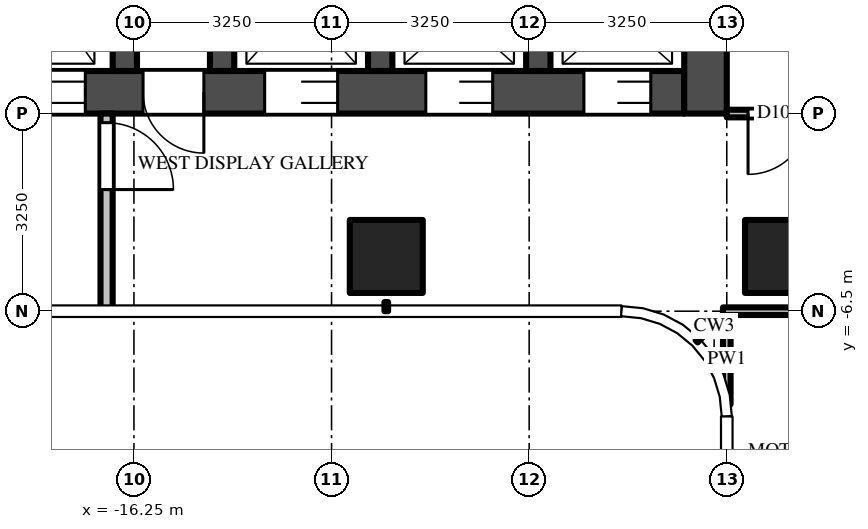
"""IFC4 building model, lengths in metres.
Left out: names, types, materials, properties, quantities, classifications, styles, units other than length and angle.
Written with IfcOpenShell. Run it as: python <this file> out.ifc"""

import sys

from ifc_helpers import new_model, si_unit, direction, frame, frame_2d, origin, origin_2d, place, context, subcontext, project, spatial, rectangle, extrude, source, transform, mapped, element, fill, save


model = new_model("IFC4")
c1 = context("Model", 3, precision=1e-05, world=origin(), true_north=direction((0.0, 1.0)))
c2 = subcontext(c1, "Body", "Model", "MODEL_VIEW")
j1 = project(units=[si_unit("LENGTHUNIT", "METRE"), si_unit("PLANEANGLEUNIT", "RADIAN")], contexts=[c1])
p1 = place(None, origin())
s1 = spatial("IfcSite", under=j1, at=p1, CompositionType="ELEMENT")
p2 = place(p1, origin())
s2 = spatial("IfcBuilding", under=s1, at=p2, CompositionType="ELEMENT")
p3 = place(p2, frame((0.0, 0.0, 185.4)))
s3 = spatial("IfcBuildingStorey", under=s2, at=p3, CompositionType="ELEMENT", Elevation=185.4)
m1 = source(origin(), c2, "Body", "SweptSolid", [
    extrude(rectangle(XDim=1.2, YDim=1.2, at=origin_2d()), origin(), (0.0, 0.0, 1.0), 3.9),
])
for number, where, z_axis, x_axis in (
    (1, (-5.6, -5.6, 0.0), (0.0, 0.0, 1.0), (1.0, 0.0, 0.0)),
    (2, (-12.1, -5.6, 0.0), (0.0, 0.0, 1.0), (1.0, 0.0, 0.0)),
):
    element("IfcColumn", number, at=place(p3, frame(where, z_axis=z_axis, x_axis=x_axis)), inside=s3, PredefinedType="COLUMN", context=c2, shape_type="MappedRepresentation", body=[
        mapped(m1, transform((0.0, 0.0, 0.0))),
    ])
m2 = source(origin(), c2, "Body", "SweptSolid", [
    extrude(rectangle(XDim=14.85, YDim=0.7, at=frame_2d((7.425, 0.0))), origin(), (0.0, 0.0, 1.0), 3.7),
])
p4 = place(p3, frame((-7.2, -2.9, 0.0), z_axis=(0.0, 0.0, 1.0), x_axis=(-1.0, 0.0, 0.0)))
e3 = element("IfcWall", 3, at=p4, inside=s3, PredefinedType="SHEAR", context=c2, shape_type="MappedRepresentation", body=[
    mapped(m2, transform((0.0, 0.0, 0.0))),
])
m3 = source(origin(), c2, "Body", "SweptSolid", [
    extrude(rectangle(XDim=1.1, YDim=2.1, at=frame_2d((0.55, 1.05))), frame((0.0, 0.36, 0.0), z_axis=(0.0, -1.0, 0.0), x_axis=(1.0, 0.0, 0.0)), (0.0, 0.0, 1.0), 0.72),
])
p5 = place(p4, frame((0.55, 0.0, 0.0)))
e4 = element("IfcOpeningElement", 4, at=p5, cuts=e3, PredefinedType="OPENING", context=c2, shape_type="MappedRepresentation", body=[
    mapped(m3, transform((0.0, 0.0, 0.0))),
])
p6 = place(p4, frame((3.15, 0.0, 0.0)))
e5 = element("IfcOpeningElement", 5, at=p6, cuts=e3, PredefinedType="OPENING", context=c2, shape_type="MappedRepresentation", body=[
    mapped(m3, transform((0.0, 0.0, 0.0))),
])
m4 = source(origin(), c2, "Body", "SweptSolid", [
    extrude(rectangle(XDim=1.2, YDim=2.1, at=frame_2d((0.6, 1.05))), frame((0.0, 0.36, 0.0), z_axis=(0.0, -1.0, 0.0), x_axis=(1.0, 0.0, 0.0)), (0.0, 0.0, 1.0), 0.72),
])
p7 = place(p4, frame((5.7, 0.0, 0.0)))
e6 = element("IfcOpeningElement", 6, at=p7, cuts=e3, PredefinedType="OPENING", context=c2, shape_type="MappedRepresentation", body=[
    mapped(m4, transform((0.0, 0.0, 0.0))),
])
m5 = source(origin(), c2, "Body", "SweptSolid", [
    extrude(rectangle(XDim=1.3, YDim=2.1, at=frame_2d((0.65, 1.05))), frame((0.0, 0.36, 0.0), z_axis=(0.0, -1.0, 0.0), x_axis=(1.0, 0.0, 0.0)), (0.0, 0.0, 1.0), 0.72),
])
p8 = place(p4, frame((12.2, 0.0, 0.0)))
e7 = element("IfcOpeningElement", 7, at=p8, cuts=e3, PredefinedType="OPENING", context=c2, shape_type="MappedRepresentation", body=[
    mapped(m5, transform((0.0, 0.0, 0.0))),
])
p9 = place(p4, frame((9.85, 0.0, 0.0)))
e8 = element("IfcOpeningElement", 8, at=p9, cuts=e3, PredefinedType="OPENING", context=c2, shape_type="MappedRepresentation", body=[
    mapped(m4, transform((0.0, 0.0, 0.0))),
])
m6 = source(origin(), c2, "Body", "SweptSolid", [
    extrude(rectangle(XDim=1.0, YDim=2.1, at=frame_2d((0.5, 1.05))), frame((0.0, 0.36, 0.0), z_axis=(0.0, -1.0, 0.0), x_axis=(1.0, 0.0, 0.0)), (0.0, 0.0, 1.0), 0.72),
])
p10 = place(p4, frame((7.9, 0.0, 0.0)))
e9 = element("IfcOpeningElement", 9, at=p10, cuts=e3, PredefinedType="OPENING", context=c2, shape_type="MappedRepresentation", body=[
    mapped(m6, transform((0.0, 0.0, 0.0))),
])
m7 = source(origin(), c2, "Body", "SweptSolid", [
    extrude(rectangle(XDim=9.05, YDim=0.7, at=frame_2d((4.525, 0.0))), origin(), (0.0, 0.0, 1.0), 3.7),
])
p11 = place(p3, frame((-6.85, 5.8, 0.0), z_axis=(0.0, 0.0, 1.0), x_axis=(0.0, -1.0, 0.0)))
e10 = element("IfcWall", 10, at=p11, inside=s3, PredefinedType="SHEAR", context=c2, shape_type="MappedRepresentation", body=[
    mapped(m7, transform((0.0, 0.0, 0.0))),
])
m8 = source(origin(), c2, "Body", "SweptSolid", [
    extrude(rectangle(XDim=1.8, YDim=2.1, at=frame_2d((0.9, 1.05))), frame((0.0, 0.36, 0.0), z_axis=(0.0, -1.0, 0.0), x_axis=(1.0, 0.0, 0.0)), (0.0, 0.0, 1.0), 0.72),
])
p12 = place(p11, frame((3.15, 0.0, 0.0)))
e11 = element("IfcOpeningElement", 11, at=p12, cuts=e10, PredefinedType="OPENING", context=c2, shape_type="MappedRepresentation", body=[
    mapped(m8, transform((0.0, 0.0, 0.0))),
])
m9 = source(origin(), c2, "Body", "SweptSolid", [
    extrude(rectangle(XDim=2.45, YDim=0.4, at=frame_2d((1.225, 0.0))), origin(), (0.0, 0.0, 1.0), 3.7),
])
for number, where, z_axis, x_axis in (
    (12, (-9.6, -0.1, 0.0), (0.0, 0.0, 1.0), (0.0, -1.0, 0.0)),
    (13, (-12.2, -0.1, 0.0), (0.0, 0.0, 1.0), (0.0, -1.0, 0.0)),
    (14, (-14.8, -0.1, 0.0), (0.0, 0.0, 1.0), (0.0, -1.0, 0.0)),
    (15, (-16.4, -0.1, 0.0), (0.0, 0.0, 1.0), (0.0, -1.0, 0.0)),
):
    element("IfcWall", number, at=place(p3, frame(where, z_axis=z_axis, x_axis=x_axis)), inside=s3, PredefinedType="SHEAR", context=c2, shape_type="MappedRepresentation", body=[
        mapped(m9, transform((0.0, 0.0, 0.0))),
    ])
m10 = source(origin(), c2, "Body", "SweptSolid", [
    extrude(rectangle(XDim=3.25, YDim=0.2, at=frame_2d((1.625, 0.0))), origin(), (0.0, 0.0, 1.0), 3.7),
])
p13 = place(p3, frame((-16.7, -3.25, 0.0), z_axis=(0.0, 0.0, 1.0), x_axis=(0.0, -1.0, 0.0)))
e16 = element("IfcWall", 16, at=p13, inside=s3, PredefinedType="PARTITIONING", context=c2, shape_type="MappedRepresentation", body=[
    mapped(m10, transform((0.0, 0.0, 0.0))),
])
m11 = source(origin(), c2, "Body", "SweptSolid", [
    extrude(rectangle(XDim=1.1, YDim=2.1, at=frame_2d((0.55, 1.05))), frame((0.0, 0.11, 0.0), z_axis=(0.0, -1.0, 0.0), x_axis=(1.0, 0.0, 0.0)), (0.0, 0.0, 1.0), 0.22),
])
p14 = place(p13, frame((0.15, 0.0, 0.0)))
e17 = element("IfcOpeningElement", 17, at=p14, cuts=e16, PredefinedType="OPENING", context=c2, shape_type="MappedRepresentation", body=[
    mapped(m11, transform((0.0, 0.0, 0.0))),
])
m12 = source(origin(), c2, "Body", "SweptSolid", [
    extrude(rectangle(XDim=1.469, YDim=0.125, at=frame_2d((0.734, 0.0))), origin(), (0.0, 0.0, 1.0), 3.7),
])
p15 = place(p3, frame((-6.5, -6.562, 0.0), z_axis=(0.0, 0.0, 1.0), x_axis=(0.0, -1.0, 0.0)))
e18 = element("IfcWall", 18, at=p15, inside=s3, PredefinedType="PARTITIONING", context=c2, shape_type="MappedRepresentation", body=[
    mapped(m12, transform((0.0, 0.0, 0.0))),
])
m13 = source(origin(), c2, "Body", "SweptSolid", [
    extrude(rectangle(XDim=3.725, YDim=0.125, at=frame_2d((1.863, 0.0))), origin(), (0.0, 0.0, 1.0), 2.78),
])
p16 = place(p3, frame((-2.837, -6.5, 0.0), z_axis=(0.0, 0.0, 1.0), x_axis=(-1.0, 0.0, 0.0)))
e19 = element("IfcWall", 19, at=p16, inside=s3, PredefinedType="PARTITIONING", context=c2, shape_type="MappedRepresentation", body=[
    mapped(m13, transform((0.0, 0.0, 0.0))),
])
m14 = source(origin(), c2, "Body", "SweptSolid", [
    extrude(rectangle(XDim=5.363, YDim=0.125, at=frame_2d((2.681, 0.0))), origin(), (0.0, 0.0, 1.0), 2.997),
])
p17 = place(p3, frame((-1.137, -3.25, 0.0), z_axis=(0.0, 0.0, 1.0), x_axis=(-1.0, 0.0, 0.0)))
e20 = element("IfcWall", 20, at=p17, inside=s3, PredefinedType="PARTITIONING", context=c2, shape_type="MappedRepresentation", body=[
    mapped(m14, transform((0.0, 0.0, 0.0))),
])
m15 = source(origin(), c2, "Body", "SweptSolid", [
    extrude(rectangle(XDim=1.0, YDim=2.1, at=frame_2d((0.5, 1.05))), frame((0.0, 0.073, 0.0), z_axis=(0.0, -1.0, 0.0), x_axis=(1.0, 0.0, 0.0)), (0.0, 0.0, 1.0), 0.145),
])
p18 = place(p17, frame((4.012, 0.0, 0.0)))
e21 = element("IfcOpeningElement", 21, at=p18, cuts=e20, PredefinedType="OPENING", context=c2, shape_type="MappedRepresentation", body=[
    mapped(m15, transform((0.0, 0.0, 0.0))),
])
m16 = source(origin(), c2, "Body", "SweptSolid", [
    extrude(rectangle(XDim=1.1, YDim=2.1, at=frame_2d((0.55, 1.05))), frame((0.0, -0.275, 0.0), z_axis=(0.0, -1.0, 0.0), x_axis=(1.0, 0.0, 0.0)), (0.0, 0.0, 1.0), 0.05),
])
p19 = place(p5, origin())
e22 = element("IfcDoor", 22, at=p19, inside=s3, OperationType="DOUBLE_DOOR_SLIDING", PredefinedType="DOOR", context=c2, shape_type="MappedRepresentation", body=[
    mapped(m16, transform((0.0, 0.0, 0.0))),
])
fill(e4, e22)
p20 = place(p6, origin())
e23 = element("IfcDoor", 23, at=p20, inside=s3, OperationType="DOUBLE_DOOR_SLIDING", PredefinedType="DOOR", context=c2, shape_type="MappedRepresentation", body=[
    mapped(m16, transform((0.0, 0.0, 0.0))),
])
fill(e5, e23)
m17 = source(origin(), c2, "Body", "SweptSolid", [
    extrude(rectangle(XDim=1.2, YDim=2.1, at=frame_2d((0.6, 1.05))), frame((0.0, -0.275, 0.0), z_axis=(0.0, -1.0, 0.0), x_axis=(1.0, 0.0, 0.0)), (0.0, 0.0, 1.0), 0.05),
])
p21 = place(p7, origin())
e24 = element("IfcDoor", 24, at=p21, inside=s3, OperationType="DOUBLE_DOOR_SLIDING", PredefinedType="DOOR", context=c2, shape_type="MappedRepresentation", body=[
    mapped(m17, transform((0.0, 0.0, 0.0))),
])
fill(e6, e24)
p22 = place(p9, origin())
e25 = element("IfcDoor", 25, at=p22, inside=s3, OperationType="DOUBLE_DOOR_SLIDING", PredefinedType="DOOR", context=c2, shape_type="MappedRepresentation", body=[
    mapped(m17, transform((0.0, 0.0, 0.0))),
])
fill(e8, e25)
m18 = source(origin(), c2, "Body", "SweptSolid", [
    extrude(rectangle(XDim=1.0, YDim=2.1, at=frame_2d((0.5, 1.05))), frame((0.0, -0.275, 0.0), z_axis=(0.0, -1.0, 0.0), x_axis=(1.0, 0.0, 0.0)), (0.0, 0.0, 1.0), 0.05),
])
p23 = place(p10, origin())
e26 = element("IfcDoor", 26, at=p23, inside=s3, OperationType="SINGLE_SWING_LEFT", PredefinedType="DOOR", context=c2, shape_type="MappedRepresentation", body=[
    mapped(m18, transform((0.0, 0.0, 0.0))),
])
fill(e9, e26)
m19 = source(origin(), c2, "Body", "SweptSolid", [
    extrude(rectangle(XDim=1.1, YDim=2.1, at=frame_2d((0.55, 1.05))), frame((0.0, 0.025, 0.0), z_axis=(0.0, -1.0, 0.0), x_axis=(1.0, 0.0, 0.0)), (0.0, 0.0, 1.0), 0.05),
])
p24 = place(p14, origin())
e27 = element("IfcDoor", 27, at=p24, inside=s3, OperationType="SINGLE_SWING_RIGHT", PredefinedType="DOOR", context=c2, shape_type="MappedRepresentation", body=[
    mapped(m19, transform((0.0, 0.0, 0.0))),
])
fill(e17, e27)
m20 = source(origin(), c2, "Body", "SweptSolid", [
    extrude(rectangle(XDim=1.0, YDim=2.1, at=frame_2d((0.5, 1.05))), frame((0.0, 0.025, 0.0), z_axis=(0.0, -1.0, 0.0), x_axis=(1.0, 0.0, 0.0)), (0.0, 0.0, 1.0), 0.05),
])
p25 = place(p18, origin())
e28 = element("IfcDoor", 28, at=p25, inside=s3, OperationType="SINGLE_SWING_RIGHT", PredefinedType="DOOR", context=c2, shape_type="MappedRepresentation", body=[
    mapped(m20, transform((0.0, 0.0, 0.0))),
])
fill(e21, e28)
save(model, sys.argv[1])
